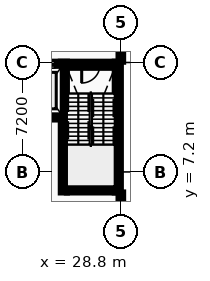
"""IFC4 building model, lengths in metres.
Left out: names, types, materials, properties, quantities, classifications, styles, units other than length and angle.
Written with IfcOpenShell. Run it as: python <this file> out.ifc"""

import sys

from ifc_helpers import new_model, si_unit, direction, frame, frame_2d, origin, place, context, subcontext, project, spatial, rectangle, extrude, element, fill, save


model = new_model("IFC4")
c1 = context("Model", 3, precision=1e-05, world=origin(), true_north=direction((0.0, 1.0)))
c2 = subcontext(c1, "Body", "Model", "MODEL_VIEW")
j1 = project(units=[si_unit("LENGTHUNIT", "METRE"), si_unit("PLANEANGLEUNIT", "RADIAN")], contexts=[c1])
p1 = place(None, origin())
s1 = spatial("IfcSite", under=j1, at=p1, CompositionType="ELEMENT")
p2 = place(p1, origin())
s2 = spatial("IfcBuilding", under=s1, at=p2, CompositionType="ELEMENT")
p3 = place(p2, frame((0.0, 0.0, 22.8)))
s3 = spatial("IfcBuildingStorey", under=s2, at=p3, CompositionType="ELEMENT", Elevation=22.8)
p4 = place(p3, frame((28.8, -0.15, 0.0), z_axis=(0.0, 0.0, 1.0), x_axis=(0.0, 1.0, 0.0)))
e1 = element("IfcWall", 1, at=p4, inside=s3, PredefinedType="STANDARD", context=c2, shape_type="SweptSolid", body=[
    extrude(rectangle(XDim=6.0, YDim=0.3, at=frame_2d((3.0, 0.0))), origin(), (0.0, 0.0, 1.0), 4.215),
])
p5 = place(p4, frame((2.2, 0.0, 1.2)))
e2 = element("IfcOpeningElement", 2, at=p5, cuts=e1, PredefinedType="OPENING", context=c2, shape_type="SweptSolid", body=[
    extrude(rectangle(XDim=1.6, YDim=1.4, at=frame_2d((0.8, 0.7))), frame((0.0, 0.16, 0.0), z_axis=(0.0, -1.0, 0.0), x_axis=(1.0, 0.0, 0.0)), (0.0, 0.0, 1.0), 0.32),
])
p6 = place(p3, frame((28.8, 14.45, 0.0), z_axis=(0.0, 0.0, 1.0), x_axis=(0.0, 1.0, 0.0)))
e3 = element("IfcWall", 3, at=p6, inside=s3, PredefinedType="STANDARD", context=c2, shape_type="SweptSolid", body=[
    extrude(rectangle(XDim=7.15, YDim=0.3, at=frame_2d((3.575, 0.0))), origin(), (0.0, 0.0, 1.0), 4.215),
])
p7 = place(p3, frame((25.25, 6.05, 0.0), z_axis=(0.0, 0.0, 1.0), x_axis=(1.0, 0.0, 0.0)))
e4 = element("IfcWall", 4, at=p7, inside=s3, PredefinedType="SHEAR", context=c2, shape_type="SweptSolid", body=[
    extrude(rectangle(XDim=3.15, YDim=0.4, at=frame_2d((1.575, 0.0))), origin(), (0.0, 0.0, 1.0), 4.215),
])
p8 = place(p3, frame((25.25, 14.25, 0.0), z_axis=(0.0, 0.0, 1.0), x_axis=(1.0, 0.0, 0.0)))
e5 = element("IfcWall", 5, at=p8, inside=s3, PredefinedType="SHEAR", context=c2, shape_type="SweptSolid", body=[
    extrude(rectangle(XDim=3.15, YDim=0.4, at=frame_2d((1.575, 0.0))), origin(), (0.0, 0.0, 1.0), 4.215),
])
p9 = place(p8, frame((0.975, 0.0, 0.0)))
e6 = element("IfcOpeningElement", 6, at=p9, cuts=e5, PredefinedType="OPENING", context=c2, shape_type="SweptSolid", body=[
    extrude(rectangle(XDim=1.2, YDim=2.15, at=frame_2d((0.6, 1.075))), frame((0.0, 0.21, 0.0), z_axis=(0.0, -1.0, 0.0), x_axis=(1.0, 0.0, 0.0)), (0.0, 0.0, 1.0), 0.42),
])
for number, where, z_axis, x_axis in (
    (7, (25.05, 5.85, 0.0), (0.0, 0.0, 1.0), (0.0, 1.0, 0.0)),
    (8, (28.6, 5.85, 0.0), (0.0, 0.0, 1.0), (0.0, 1.0, 0.0)),
):
    element("IfcWall", number, at=place(p3, frame(where, z_axis=z_axis, x_axis=x_axis)), inside=s3, PredefinedType="SHEAR", context=c2, shape_type="SweptSolid", body=[
        extrude(rectangle(XDim=8.6, YDim=0.4, at=frame_2d((4.3, 0.0))), origin(), (0.0, 0.0, 1.0), 4.215),
    ])
p10 = place(p3, frame((22.65, 10.85, 0.0), z_axis=(0.0, 0.0, 1.0), x_axis=(1.0, 0.0, 0.0)))
e9 = element("IfcWall", 9, at=p10, inside=s3, PredefinedType="SHEAR", context=c2, shape_type="SweptSolid", body=[
    extrude(rectangle(XDim=2.2, YDim=0.4, at=frame_2d((1.1, 0.0))), origin(), (0.0, 0.0, 1.0), 4.215),
])
p11 = place(p3, frame((22.65, 14.25, 0.0), z_axis=(0.0, 0.0, 1.0), x_axis=(1.0, 0.0, 0.0)))
e10 = element("IfcWall", 10, at=p11, inside=s3, PredefinedType="SHEAR", context=c2, shape_type="SweptSolid", body=[
    extrude(rectangle(XDim=2.2, YDim=0.4, at=frame_2d((1.1, 0.0))), origin(), (0.0, 0.0, 1.0), 4.215),
])
p12 = place(p11, frame((0.4, 0.0, 0.0)))
e11 = element("IfcOpeningElement", 11, at=p12, cuts=e10, PredefinedType="OPENING", context=c2, shape_type="SweptSolid", body=[
    extrude(rectangle(XDim=1.4, YDim=2.2, at=frame_2d((0.7, 1.1))), frame((0.0, 0.21, 0.0), z_axis=(0.0, -1.0, 0.0), x_axis=(1.0, 0.0, 0.0)), (0.0, 0.0, 1.0), 0.42),
])
p13 = place(p9, frame((1.2, 0.0, 0.0), z_axis=(0.0, 0.0, 1.0), x_axis=(-1.0, 0.0, 0.0)))
e12 = element("IfcDoor", 12, at=p13, inside=s3, OperationType="SINGLE_SWING_LEFT", PredefinedType="DOOR", context=c2, shape_type="SweptSolid", body=[
    extrude(rectangle(XDim=1.2, YDim=2.15, at=frame_2d((0.6, 1.075))), frame((0.0, 0.025, 0.0), z_axis=(0.0, -1.0, 0.0), x_axis=(1.0, 0.0, 0.0)), (0.0, 0.0, 1.0), 0.05),
])
fill(e6, e12)
p14 = place(p12, origin())
e13 = element("IfcDoor", 13, at=p14, inside=s3, OperationType="SLIDING_TO_LEFT", PredefinedType="DOOR", context=c2, shape_type="SweptSolid", body=[
    extrude(rectangle(XDim=1.4, YDim=2.2, at=frame_2d((0.7, 1.1))), frame((0.0, 0.025, 0.0), z_axis=(0.0, -1.0, 0.0), x_axis=(1.0, 0.0, 0.0)), (0.0, 0.0, 1.0), 0.05),
])
fill(e11, e13)
save(model, sys.argv[1])
